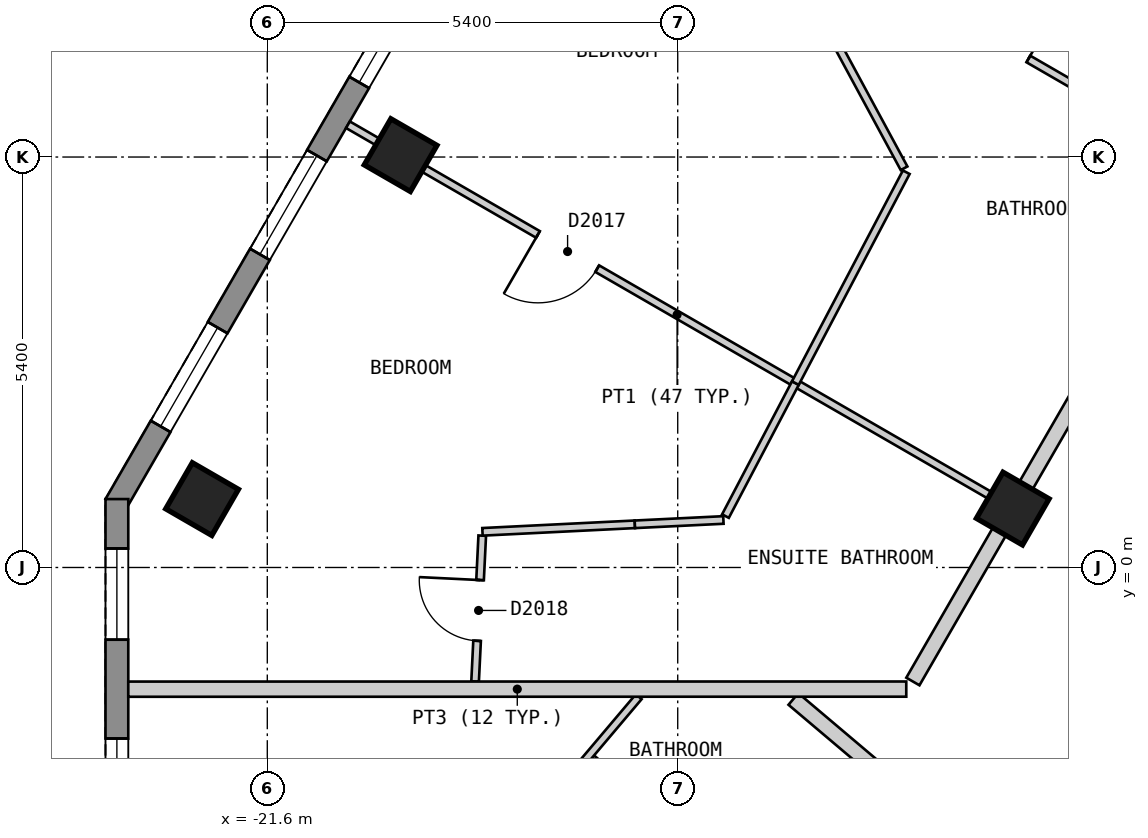
"""IFC4 building model, lengths in metres.
Left out: names, types, materials, properties, quantities, classifications, styles, units other than length and angle.
Written with IfcOpenShell. Run it as: python <this file> out.ifc"""

import sys

from ifc_helpers import new_model, si_unit, direction, frame, frame_2d, origin, origin_2d, place, context, subcontext, project, spatial, polyline, rectangle, outline, extrude, element, fill, save


model = new_model("IFC4")
c1 = context("Model", 3, precision=1e-05, world=origin(), true_north=direction((0.0, 1.0)))
c2 = subcontext(c1, "Body", "Model", "MODEL_VIEW")
j1 = project(units=[si_unit("LENGTHUNIT", "METRE"), si_unit("PLANEANGLEUNIT", "RADIAN")], contexts=[c1])
p1 = place(None, origin())
s1 = spatial("IfcSite", under=j1, at=p1, CompositionType="ELEMENT")
p2 = place(p1, origin())
s2 = spatial("IfcBuilding", under=s1, at=p2, CompositionType="ELEMENT")
p3 = place(p2, frame((0.0, 0.0, 238.8)))
s3 = spatial("IfcBuildingStorey", under=s2, at=p3, CompositionType="ELEMENT", Elevation=238.8)
for number, where, z_axis, x_axis in (
    (1, (-19.846, 5.425, 0.0), (0.0, 0.0, 1.0), (-0.5, -0.866, 0.0)),
    (2, (-22.458, 0.9, 0.0), (0.0, 0.0, 1.0), (-0.5, -0.866, 0.0)),
    (3, (-11.792, 0.775, 0.0), (0.0, 0.0, 1.0), (-0.5, -0.866, 0.0)),
):
    element("IfcColumn", number, at=place(p3, frame(where, z_axis=z_axis, x_axis=x_axis)), inside=s3, PredefinedType="COLUMN", context=c2, shape_type="SweptSolid", body=[
        extrude(rectangle(XDim=0.7, YDim=0.7, at=origin_2d()), origin(), (0.0, 0.0, 1.0), 3.0),
    ])
p4 = place(p3, frame((-12.514, 20.025, 0.0), z_axis=(0.0, 0.0, 1.0), x_axis=(-0.500003656944, -0.866023292436, 0.0)))
e4 = element("IfcWall", 4, at=p4, inside=s3, PredefinedType="SOLIDWALL", context=c2, shape_type="SweptSolid", body=[
    extrude(outline(polyline([(0.0, -0.15), (22.17, -0.15), (22.09, 0.15), (0.08, 0.15), (0.0, -0.15)])), origin(), (0.0, 0.0, 1.0), 2.7),
])
p5 = place(p4, frame((1.191, 0.0, 0.15)))
e5 = element("IfcOpeningElement", 5, at=p5, cuts=e4, PredefinedType="OPENING", context=c2, shape_type="SweptSolid", body=[
    extrude(rectangle(XDim=1.5, YDim=2.1, at=frame_2d((0.75, 1.05))), frame((0.0, 0.16, 0.0), z_axis=(0.0, -1.0, 0.0), x_axis=(1.0, 0.0, 0.0)), (0.0, 0.0, 1.0), 0.32),
])
p6 = place(p4, frame((3.804, 0.0, 0.15)))
e6 = element("IfcOpeningElement", 6, at=p6, cuts=e4, PredefinedType="OPENING", context=c2, shape_type="SweptSolid", body=[
    extrude(rectangle(XDim=1.5, YDim=2.1, at=frame_2d((0.75, 1.05))), frame((0.0, 0.16, 0.0), z_axis=(0.0, -1.0, 0.0), x_axis=(1.0, 0.0, 0.0)), (0.0, 0.0, 1.0), 0.32),
])
p7 = place(p4, frame((6.416, 0.0, 0.15)))
e7 = element("IfcOpeningElement", 7, at=p7, cuts=e4, PredefinedType="OPENING", context=c2, shape_type="SweptSolid", body=[
    extrude(rectangle(XDim=1.5, YDim=2.1, at=frame_2d((0.75, 1.05))), frame((0.0, 0.16, 0.0), z_axis=(0.0, -1.0, 0.0), x_axis=(1.0, 0.0, 0.0)), (0.0, 0.0, 1.0), 0.32),
])
p8 = place(p4, frame((9.029, 0.0, 0.15)))
e8 = element("IfcOpeningElement", 8, at=p8, cuts=e4, PredefinedType="OPENING", context=c2, shape_type="SweptSolid", body=[
    extrude(rectangle(XDim=1.5, YDim=2.1, at=frame_2d((0.75, 1.05))), frame((0.0, 0.16, 0.0), z_axis=(0.0, -1.0, 0.0), x_axis=(1.0, 0.0, 0.0)), (0.0, 0.0, 1.0), 0.32),
])
p9 = place(p4, frame((11.641, 0.0, 0.15)))
e9 = element("IfcOpeningElement", 9, at=p9, cuts=e4, PredefinedType="OPENING", context=c2, shape_type="SweptSolid", body=[
    extrude(rectangle(XDim=1.5, YDim=2.1, at=frame_2d((0.75, 1.05))), frame((0.0, 0.16, 0.0), z_axis=(0.0, -1.0, 0.0), x_axis=(1.0, 0.0, 0.0)), (0.0, 0.0, 1.0), 0.32),
])
p10 = place(p4, frame((14.254, 0.0, 0.15)))
e10 = element("IfcOpeningElement", 10, at=p10, cuts=e4, PredefinedType="OPENING", context=c2, shape_type="SweptSolid", body=[
    extrude(rectangle(XDim=1.5, YDim=2.1, at=frame_2d((0.75, 1.05))), frame((0.0, 0.16, 0.0), z_axis=(0.0, -1.0, 0.0), x_axis=(1.0, 0.0, 0.0)), (0.0, 0.0, 1.0), 0.32),
])
p11 = place(p4, frame((16.866, 0.0, 0.15)))
e11 = element("IfcOpeningElement", 11, at=p11, cuts=e4, PredefinedType="OPENING", context=c2, shape_type="SweptSolid", body=[
    extrude(rectangle(XDim=1.5, YDim=2.1, at=frame_2d((0.75, 1.05))), frame((0.0, 0.16, 0.0), z_axis=(0.0, -1.0, 0.0), x_axis=(1.0, 0.0, 0.0)), (0.0, 0.0, 1.0), 0.32),
])
p12 = place(p4, frame((19.479, 0.0, 0.15)))
e12 = element("IfcOpeningElement", 12, at=p12, cuts=e4, PredefinedType="OPENING", context=c2, shape_type="SweptSolid", body=[
    extrude(rectangle(XDim=1.5, YDim=2.1, at=frame_2d((0.75, 1.05))), frame((0.0, 0.16, 0.0), z_axis=(0.0, -1.0, 0.0), x_axis=(1.0, 0.0, 0.0)), (0.0, 0.0, 1.0), 0.32),
])
p13 = place(p3, frame((-23.579, 0.9, 0.0), z_axis=(0.0, 0.0, 1.0), x_axis=(0.0, -1.0, 0.0)))
e13 = element("IfcWall", 13, at=p13, inside=s3, PredefinedType="SOLIDWALL", context=c2, shape_type="SweptSolid", body=[
    extrude(outline(polyline([(0.0, -0.15), (5.0, -0.15), (4.92, 0.15), (0.08, 0.15), (0.0, -0.15)])), origin(), (0.0, 0.0, 1.0), 2.7),
])
p14 = place(p13, frame((0.65, 0.0, 0.15)))
e14 = element("IfcOpeningElement", 14, at=p14, cuts=e13, PredefinedType="OPENING", context=c2, shape_type="SweptSolid", body=[
    extrude(rectangle(XDim=1.2, YDim=2.1, at=frame_2d((0.6, 1.05))), frame((0.0, 0.16, 0.0), z_axis=(0.0, -1.0, 0.0), x_axis=(1.0, 0.0, 0.0)), (0.0, 0.0, 1.0), 0.32),
])
p15 = place(p13, frame((3.15, 0.0, 0.15)))
e15 = element("IfcOpeningElement", 15, at=p15, cuts=e13, PredefinedType="OPENING", context=c2, shape_type="SweptSolid", body=[
    extrude(rectangle(XDim=1.2, YDim=2.1, at=frame_2d((0.6, 1.05))), frame((0.0, 0.16, 0.0), z_axis=(0.0, -1.0, 0.0), x_axis=(1.0, 0.0, 0.0)), (0.0, 0.0, 1.0), 0.32),
])
p16 = place(p3, frame((-13.106, -1.5, 0.0), z_axis=(0.0, 0.0, 1.0), x_axis=(0.500025705601, 0.86601056214, 0.0)))
e16 = element("IfcWall", 16, at=p16, inside=s3, PredefinedType="PARTITIONING", context=c2, shape_type="SweptSolid", body=[
    extrude(rectangle(XDim=7.735, YDim=0.2, at=frame_2d((3.868, 0.0))), origin(), (0.0, 0.0, 1.0), 2.7),
])
p17 = place(p3, frame((-14.68, 7.947, 0.0), z_axis=(0.0, 0.0, 1.0), x_axis=(0.475823637798, -0.879540712936, 0.0)))
e17 = element("IfcWall", 17, at=p17, inside=s3, PredefinedType="PARTITIONING", context=c2, shape_type="SweptSolid", body=[
    extrude(rectangle(XDim=3.064, YDim=0.1, at=frame_2d((1.532, 0.0))), origin(), (0.0, 0.0, 1.0), 2.7),
])
p18 = place(p3, frame((-20.539, 5.825, 0.0), z_axis=(0.0, 0.0, 1.0), x_axis=(0.866047370643, -0.499961950354, 0.0)))
e18 = element("IfcWall", 18, at=p18, inside=s3, PredefinedType="PARTITIONING", context=c2, shape_type="SweptSolid", body=[
    extrude(rectangle(XDim=10.001, YDim=0.1, at=frame_2d((5.0, 0.0))), origin(), (0.0, 0.0, 1.0), 2.7),
])
p19 = place(p18, frame((2.887, 0.0, 0.0)))
e19 = element("IfcOpeningElement", 19, at=p19, cuts=e18, PredefinedType="OPENING", context=c2, shape_type="SweptSolid", body=[
    extrude(rectangle(XDim=0.9, YDim=2.1, at=frame_2d((0.45, 1.05))), frame((0.0, 0.06, 0.0), z_axis=(0.0, -1.0, 0.0), x_axis=(1.0, 0.0, 0.0)), (0.0, 0.0, 1.0), 0.12),
])
p20 = place(p3, frame((-17.926, 10.35, 0.0), z_axis=(0.0, 0.0, 1.0), x_axis=(0.866018411306, -0.500012111133, 0.0)))
e20 = element("IfcWall", 20, at=p20, inside=s3, PredefinedType="PARTITIONING", context=c2, shape_type="SweptSolid", body=[
    extrude(rectangle(XDim=9.898, YDim=0.1, at=frame_2d((4.949, 0.0))), origin(), (0.0, 0.0, 1.0), 2.7),
])
p21 = place(p20, frame((6.52, 0.0, 0.0)))
e21 = element("IfcOpeningElement", 21, at=p21, cuts=e20, PredefinedType="OPENING", context=c2, shape_type="SweptSolid", body=[
    extrude(rectangle(XDim=0.8, YDim=2.1, at=frame_2d((0.4, 1.05))), frame((0.0, 0.06, 0.0), z_axis=(0.0, -1.0, 0.0), x_axis=(1.0, 0.0, 0.0)), (0.0, 0.0, 1.0), 0.12),
])
p22 = place(p20, frame((1.521, 0.0, 0.0)))
e22 = element("IfcOpeningElement", 22, at=p22, cuts=e20, PredefinedType="OPENING", context=c2, shape_type="SweptSolid", body=[
    extrude(rectangle(XDim=0.9, YDim=2.1, at=frame_2d((0.45, 1.05))), frame((0.0, 0.06, 0.0), z_axis=(0.0, -1.0, 0.0), x_axis=(1.0, 0.0, 0.0)), (0.0, 0.0, 1.0), 0.12),
])
p23 = place(p3, frame((-17.333, -2.511, 0.0), z_axis=(0.0, 0.0, 1.0), x_axis=(0.763651478242, -0.645628701174, 0.0)))
e23 = element("IfcWall", 23, at=p23, inside=s3, PredefinedType="PARTITIONING", context=c2, shape_type="SweptSolid", body=[
    extrude(rectangle(XDim=2.269, YDim=0.1, at=frame_2d((1.135, 0.0))), origin(), (0.0, 0.0, 1.0), 2.7),
])
p24 = place(p23, frame((0.775, 0.0, 0.0)))
e24 = element("IfcOpeningElement", 24, at=p24, cuts=e23, PredefinedType="OPENING", context=c2, shape_type="SweptSolid", body=[
    extrude(rectangle(XDim=0.8, YDim=2.1, at=frame_2d((0.4, 1.05))), frame((0.0, 0.06, 0.0), z_axis=(0.0, -1.0, 0.0), x_axis=(1.0, 0.0, 0.0)), (0.0, 0.0, 1.0), 0.12),
])
p25 = place(p3, frame((-20.141, -5.754, 0.0), z_axis=(0.0, 0.0, 1.0), x_axis=(0.645717522601, 0.763576375359, 0.0)))
e25 = element("IfcWall", 25, at=p25, inside=s3, PredefinedType="PARTITIONING", context=c2, shape_type="SweptSolid", body=[
    extrude(rectangle(XDim=5.309, YDim=0.1, at=frame_2d((2.655, 0.0))), origin(), (0.0, 0.0, 1.0), 2.7),
])
p26 = place(p25, frame((2.85, 0.0, 0.0)))
e26 = element("IfcOpeningElement", 26, at=p26, cuts=e25, PredefinedType="OPENING", context=c2, shape_type="SweptSolid", body=[
    extrude(rectangle(XDim=0.9, YDim=2.1, at=frame_2d((0.45, 1.05))), frame((0.0, 0.06, 0.0), z_axis=(0.0, -1.0, 0.0), x_axis=(1.0, 0.0, 0.0)), (0.0, 0.0, 1.0), 0.12),
])
p27 = place(p3, frame((-15.572, 0.676, 0.0), z_axis=(0.0, 0.0, 1.0), x_axis=(0.465298498919, 0.885153832339, 0.0)))
e27 = element("IfcWall", 27, at=p27, inside=s3, PredefinedType="PARTITIONING", context=c2, shape_type="SweptSolid", body=[
    extrude(rectangle(XDim=1.977, YDim=0.1, at=frame_2d((0.989, 0.0))), origin(), (0.0, 0.0, 1.0), 2.7),
])
p28 = place(p3, frame((-18.866, -1.5, 0.0), z_axis=(0.0, 0.0, 1.0), x_axis=(0.048923533446, 0.998802526967, 0.0)))
e28 = element("IfcWall", 28, at=p28, inside=s3, PredefinedType="PARTITIONING", context=c2, shape_type="SweptSolid", body=[
    extrude(rectangle(XDim=1.921, YDim=0.1, at=frame_2d((0.96, 0.0))), origin(), (0.0, 0.0, 1.0), 2.7),
])
p29 = place(p28, frame((0.536, 0.0, 0.0)))
e29 = element("IfcOpeningElement", 29, at=p29, cuts=e28, PredefinedType="OPENING", context=c2, shape_type="SweptSolid", body=[
    extrude(rectangle(XDim=0.8, YDim=2.1, at=frame_2d((0.4, 1.05))), frame((0.0, 0.06, 0.0), z_axis=(0.0, -1.0, 0.0), x_axis=(1.0, 0.0, 0.0)), (0.0, 0.0, 1.0), 0.12),
])
p30 = place(p3, frame((-18.769, 0.469, 0.0), z_axis=(0.0, 0.0, 1.0), x_axis=(0.998780383332, 0.049373534108, 0.0)))
e30 = element("IfcWall", 30, at=p30, inside=s3, PredefinedType="PARTITIONING", context=c2, shape_type="SweptSolid", body=[
    extrude(rectangle(XDim=2.008, YDim=0.1, at=frame_2d((1.004, 0.0))), origin(), (0.0, 0.0, 1.0), 2.7),
])
p31 = place(p3, frame((-16.764, 0.568, 0.0), z_axis=(0.0, 0.0, 1.0), x_axis=(0.998809616198, 0.048778587419, 0.0)))
e31 = element("IfcWall", 31, at=p31, inside=s3, PredefinedType="PARTITIONING", context=c2, shape_type="SweptSolid", body=[
    extrude(rectangle(XDim=1.166, YDim=0.1, at=frame_2d((0.583, 0.0))), origin(), (0.0, 0.0, 1.0), 2.7),
])
p32 = place(p3, frame((-14.678, -1.73, 0.0), z_axis=(0.0, 0.0, 1.0), x_axis=(0.763428399558, -0.645892466861, 0.0)))
e32 = element("IfcWall", 32, at=p32, inside=s3, PredefinedType="PARTITIONING", context=c2, shape_type="SweptSolid", body=[
    extrude(rectangle(XDim=1.539, YDim=0.2, at=frame_2d((0.77, 0.0))), origin(), (0.0, 0.0, 1.0), 2.7),
])
p33 = place(p3, frame((-23.429, -1.601, 0.0), z_axis=(0.0, 0.0, 1.0), x_axis=(0.999999995449, 9.5406191e-05, 0.0)))
e33 = element("IfcWall", 33, at=p33, inside=s3, PredefinedType="PARTITIONING", context=c2, shape_type="SweptSolid", body=[
    extrude(rectangle(XDim=10.236, YDim=0.2, at=frame_2d((5.118, 0.0))), origin(), (0.0, 0.0, 1.0), 2.7),
])
p34 = place(p3, frame((-14.652, 2.426, 0.0), z_axis=(0.0, 0.0, 1.0), x_axis=(0.465502421984, 0.885046606189, 0.0)))
e34 = element("IfcWall", 34, at=p34, inside=s3, PredefinedType="PARTITIONING", context=c2, shape_type="SweptSolid", body=[
    extrude(rectangle(XDim=3.134, YDim=0.1, at=frame_2d((1.567, 0.0))), origin(), (0.0, 0.0, 1.0), 2.7),
])
p35 = place(p10, origin())
e35 = element("IfcWindow", 35, at=p35, inside=s3, PartitioningType="SINGLE_PANEL", PredefinedType="WINDOW", context=c2, shape_type="SweptSolid", body=[
    extrude(rectangle(XDim=1.5, YDim=2.1, at=frame_2d((0.75, 1.05))), frame((0.0, 0.03, 0.0), z_axis=(0.0, -1.0, 0.0), x_axis=(1.0, 0.0, 0.0)), (0.0, 0.0, 1.0), 0.06),
])
fill(e10, e35)
p36 = place(p11, origin())
e36 = element("IfcWindow", 36, at=p36, inside=s3, PartitioningType="SINGLE_PANEL", PredefinedType="WINDOW", context=c2, shape_type="SweptSolid", body=[
    extrude(rectangle(XDim=1.5, YDim=2.1, at=frame_2d((0.75, 1.05))), frame((0.0, 0.03, 0.0), z_axis=(0.0, -1.0, 0.0), x_axis=(1.0, 0.0, 0.0)), (0.0, 0.0, 1.0), 0.06),
])
fill(e11, e36)
p37 = place(p12, origin())
e37 = element("IfcWindow", 37, at=p37, inside=s3, PartitioningType="SINGLE_PANEL", PredefinedType="WINDOW", context=c2, shape_type="SweptSolid", body=[
    extrude(rectangle(XDim=1.5, YDim=2.1, at=frame_2d((0.75, 1.05))), frame((0.0, 0.03, 0.0), z_axis=(0.0, -1.0, 0.0), x_axis=(1.0, 0.0, 0.0)), (0.0, 0.0, 1.0), 0.06),
])
fill(e12, e37)
p38 = place(p14, origin())
e38 = element("IfcWindow", 38, at=p38, inside=s3, PartitioningType="SINGLE_PANEL", PredefinedType="WINDOW", context=c2, shape_type="SweptSolid", body=[
    extrude(rectangle(XDim=1.2, YDim=2.1, at=frame_2d((0.6, 1.05))), frame((0.0, 0.03, 0.0), z_axis=(0.0, -1.0, 0.0), x_axis=(1.0, 0.0, 0.0)), (0.0, 0.0, 1.0), 0.06),
])
fill(e14, e38)
p39 = place(p15, origin())
e39 = element("IfcWindow", 39, at=p39, inside=s3, PartitioningType="SINGLE_PANEL", PredefinedType="WINDOW", context=c2, shape_type="SweptSolid", body=[
    extrude(rectangle(XDim=1.2, YDim=2.1, at=frame_2d((0.6, 1.05))), frame((0.0, 0.03, 0.0), z_axis=(0.0, -1.0, 0.0), x_axis=(1.0, 0.0, 0.0)), (0.0, 0.0, 1.0), 0.06),
])
fill(e15, e39)
p40 = place(p21, origin())
e40 = element("IfcDoor", 40, at=p40, inside=s3, OperationType="SINGLE_SWING_RIGHT", PredefinedType="DOOR", context=c2, shape_type="SweptSolid", body=[
    extrude(rectangle(XDim=0.8, YDim=2.1, at=frame_2d((0.4, 1.05))), frame((0.0, 0.025, 0.0), z_axis=(0.0, -1.0, 0.0), x_axis=(1.0, 0.0, 0.0)), (0.0, 0.0, 1.0), 0.05),
])
fill(e21, e40)
p41 = place(p19, origin())
e41 = element("IfcDoor", 41, at=p41, inside=s3, OperationType="SINGLE_SWING_LEFT", PredefinedType="DOOR", context=c2, shape_type="SweptSolid", body=[
    extrude(rectangle(XDim=0.9, YDim=2.1, at=frame_2d((0.45, 1.05))), frame((0.0, 0.025, 0.0), z_axis=(0.0, -1.0, 0.0), x_axis=(1.0, 0.0, 0.0)), (0.0, 0.0, 1.0), 0.05),
])
fill(e19, e41)
p42 = place(p29, origin())
e42 = element("IfcDoor", 42, at=p42, inside=s3, OperationType="SINGLE_SWING_RIGHT", PredefinedType="DOOR", context=c2, shape_type="SweptSolid", body=[
    extrude(rectangle(XDim=0.8, YDim=2.1, at=frame_2d((0.4, 1.05))), frame((0.0, 0.025, 0.0), z_axis=(0.0, -1.0, 0.0), x_axis=(1.0, 0.0, 0.0)), (0.0, 0.0, 1.0), 0.05),
])
fill(e29, e42)
save(model, sys.argv[1])
